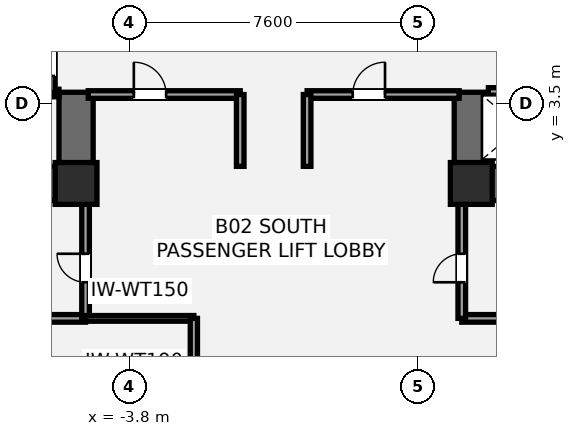
"""IFC4 building model, lengths in metres.
Left out: names, types, materials, properties, quantities, classifications, styles, units other than length and angle.
Written with IfcOpenShell. Run it as: python <this file> out.ifc"""

import sys

from ifc_helpers import new_model, si_unit, direction, frame, frame_2d, origin, origin_2d, place, context, subcontext, project, spatial, rectangle, extrude, element, fill, save


model = new_model("IFC4")
c1 = context("Model", 3, precision=1e-05, world=origin(), true_north=direction((0.0, 1.0)))
c2 = subcontext(c1, "Body", "Model", "MODEL_VIEW")
j1 = project(units=[si_unit("LENGTHUNIT", "METRE"), si_unit("PLANEANGLEUNIT", "RADIAN")], contexts=[c1])
p1 = place(None, origin())
s1 = spatial("IfcSite", under=j1, at=p1, CompositionType="ELEMENT")
p2 = place(p1, origin())
s2 = spatial("IfcBuilding", under=s1, at=p2, CompositionType="ELEMENT")
p3 = place(p2, frame((0.0, 0.0, -8.8)))
s3 = spatial("IfcBuildingStorey", under=s2, at=p3, CompositionType="ELEMENT", Elevation=-8.8)
p4 = place(p3, frame((-4.75, 1.4, 0.0), z_axis=(0.0, 0.0, 1.0), x_axis=(-1.0, 0.0, 0.0)))
e1 = element("IfcWall", 1, at=p4, inside=s3, PredefinedType="SHEAR", context=c2, shape_type="SweptSolid", body=[
    extrude(rectangle(XDim=9.3, YDim=0.9, at=frame_2d((4.65, 0.0))), origin(), (0.0, 0.0, 1.0), 4.4),
])
p5 = place(p4, frame((5.55, 0.0, 0.0)))
e2 = element("IfcOpeningElement", 2, at=p5, cuts=e1, PredefinedType="OPENING", context=c2, shape_type="SweptSolid", body=[
    extrude(rectangle(XDim=1.05, YDim=2.15, at=frame_2d((0.525, 1.075))), frame((0.0, 0.46, 0.0), z_axis=(0.0, -1.0, 0.0), x_axis=(1.0, 0.0, 0.0)), (0.0, 0.0, 1.0), 0.92),
])
p6 = place(p4, frame((3.88, 0.0, 0.0)))
e3 = element("IfcOpeningElement", 3, at=p6, cuts=e1, PredefinedType="OPENING", context=c2, shape_type="SweptSolid", body=[
    extrude(rectangle(XDim=1.1, YDim=2.2, at=frame_2d((0.55, 1.1))), frame((0.0, 0.46, 0.0), z_axis=(0.0, -1.0, 0.0), x_axis=(1.0, 0.0, 0.0)), (0.0, 0.0, 1.0), 0.92),
])
p7 = place(p3, frame((-5.2, 0.95, 0.0), z_axis=(0.0, 0.0, 1.0), x_axis=(0.0, 1.0, 0.0)))
e4 = element("IfcWall", 4, at=p7, inside=s3, PredefinedType="SHEAR", context=c2, shape_type="SweptSolid", body=[
    extrude(rectangle(XDim=2.85, YDim=0.9, at=frame_2d((1.425, 0.0))), origin(), (0.0, 0.0, 1.0), 4.4),
])
p8 = place(p3, frame((14.05, 1.4, 0.0), z_axis=(0.0, 0.0, 1.0), x_axis=(-1.0, 0.0, 0.0)))
e5 = element("IfcWall", 5, at=p8, inside=s3, PredefinedType="SHEAR", context=c2, shape_type="SweptSolid", body=[
    extrude(rectangle(XDim=9.3, YDim=0.9, at=frame_2d((4.65, 0.0))), origin(), (0.0, 0.0, 1.0), 4.4),
])
p9 = place(p8, frame((2.7, 0.0, 0.0)))
e6 = element("IfcOpeningElement", 6, at=p9, cuts=e5, PredefinedType="OPENING", context=c2, shape_type="SweptSolid", body=[
    extrude(rectangle(XDim=1.05, YDim=2.15, at=frame_2d((0.525, 1.075))), frame((0.0, 0.46, 0.0), z_axis=(0.0, -1.0, 0.0), x_axis=(1.0, 0.0, 0.0)), (0.0, 0.0, 1.0), 0.92),
])
p10 = place(p8, frame((4.7, 0.0, 0.0)))
e7 = element("IfcOpeningElement", 7, at=p10, cuts=e5, PredefinedType="OPENING", context=c2, shape_type="SweptSolid", body=[
    extrude(rectangle(XDim=1.1, YDim=2.2, at=frame_2d((0.55, 1.1))), frame((0.0, 0.46, 0.0), z_axis=(0.0, -1.0, 0.0), x_axis=(1.0, 0.0, 0.0)), (0.0, 0.0, 1.0), 0.92),
])
p11 = place(p3, frame((5.2, 0.95, 0.0), z_axis=(0.0, 0.0, 1.0), x_axis=(0.0, 1.0, 0.0)))
e8 = element("IfcWall", 8, at=p11, inside=s3, PredefinedType="SHEAR", context=c2, shape_type="SweptSolid", body=[
    extrude(rectangle(XDim=2.85, YDim=0.9, at=frame_2d((1.425, 0.0))), origin(), (0.0, 0.0, 1.0), 4.4),
])
for number, where, z_axis, x_axis in (
    (9, (-5.2, 1.4, 0.0), (0.0, 0.0, 1.0), (1.0, 0.0, 0.0)),
    (10, (5.2, 1.4, 0.0), (0.0, 0.0, 1.0), (1.0, 0.0, 0.0)),
):
    element("IfcColumn", number, at=place(p3, frame(where, z_axis=z_axis, x_axis=x_axis)), inside=s3, PredefinedType="COLUMN", context=c2, shape_type="SweptSolid", body=[
        extrude(rectangle(XDim=1.1, YDim=1.1, at=origin_2d()), origin(), (0.0, 0.0, 1.0), 4.4),
    ])
p12 = place(p3, frame((-7.2, -2.15, 0.0), z_axis=(0.0, 0.0, 1.0), x_axis=(1.0, 0.0, 0.0)))
e11 = element("IfcWall", 11, at=p12, inside=s3, PredefinedType="SOLIDWALL", context=c2, shape_type="SweptSolid", body=[
    extrude(rectangle(XDim=2.25, YDim=0.2, at=frame_2d((1.125, 0.0))), origin(), (0.0, 0.0, 1.0), 4.14),
])
p13 = place(p3, frame((-4.95, -2.15, 0.0), z_axis=(0.0, 0.0, 1.0), x_axis=(0.0, 1.0, 0.0)))
e12 = element("IfcWall", 12, at=p13, inside=s3, PredefinedType="SOLIDWALL", context=c2, shape_type="SweptSolid", body=[
    extrude(rectangle(XDim=3.15, YDim=0.2, at=frame_2d((1.575, 0.0))), origin(), (0.0, 0.0, 1.0), 3.508),
])
p14 = place(p13, frame((0.95, 0.0, 0.0)))
e13 = element("IfcOpeningElement", 13, at=p14, cuts=e12, PredefinedType="OPENING", context=c2, shape_type="SweptSolid", body=[
    extrude(rectangle(XDim=0.75, YDim=2.1, at=frame_2d((0.375, 1.05))), frame((0.0, 0.11, 0.0), z_axis=(0.0, -1.0, 0.0), x_axis=(1.0, 0.0, 0.0)), (0.0, 0.0, 1.0), 0.22),
])
p15 = place(p3, frame((4.95, -2.15, 0.0), z_axis=(0.0, 0.0, 1.0), x_axis=(1.0, 0.0, 0.0)))
e14 = element("IfcWall", 14, at=p15, inside=s3, PredefinedType="SOLIDWALL", context=c2, shape_type="SweptSolid", body=[
    extrude(rectangle(XDim=2.25, YDim=0.2, at=frame_2d((1.125, 0.0))), origin(), (0.0, 0.0, 1.0), 4.14),
])
p16 = place(p3, frame((4.95, -2.15, 0.0), z_axis=(0.0, 0.0, 1.0), x_axis=(0.0, 1.0, 0.0)))
e15 = element("IfcWall", 15, at=p16, inside=s3, PredefinedType="SOLIDWALL", context=c2, shape_type="SweptSolid", body=[
    extrude(rectangle(XDim=3.15, YDim=0.2, at=frame_2d((1.575, 0.0))), origin(), (0.0, 0.0, 1.0), 3.508),
])
p17 = place(p16, frame((0.95, 0.0, 0.0)))
e16 = element("IfcOpeningElement", 16, at=p17, cuts=e15, PredefinedType="OPENING", context=c2, shape_type="SweptSolid", body=[
    extrude(rectangle(XDim=0.75, YDim=2.1, at=frame_2d((0.375, 1.05))), frame((0.0, 0.11, 0.0), z_axis=(0.0, -1.0, 0.0), x_axis=(1.0, 0.0, 0.0)), (0.0, 0.0, 1.0), 0.22),
])
p18 = place(p3, frame((-9.78, 3.78, 0.0), z_axis=(0.0, 0.0, 1.0), x_axis=(1.0, 0.0, 0.0)))
e17 = element("IfcWall", 17, at=p18, inside=s3, PredefinedType="SOLIDWALL", context=c2, shape_type="SweptSolid", body=[
    extrude(rectangle(XDim=4.13, YDim=0.2, at=frame_2d((2.065, 0.0))), origin(), (0.0, 0.0, 1.0), 4.14),
])
p19 = place(p3, frame((-5.85, 3.78, 0.0), z_axis=(0.0, 0.0, 1.0), x_axis=(0.0, 1.0, 0.0)))
e18 = element("IfcWall", 18, at=p19, inside=s3, PredefinedType="SOLIDWALL", context=c2, shape_type="SweptSolid", body=[
    extrude(rectangle(XDim=1.69, YDim=0.2, at=frame_2d((0.845, 0.0))), origin(), (0.0, 0.0, 1.0), 4.14),
])
p20 = place(p19, frame((0.45, 0.0, 0.0)))
e19 = element("IfcOpeningElement", 19, at=p20, cuts=e18, PredefinedType="OPENING", context=c2, shape_type="SweptSolid", body=[
    extrude(rectangle(XDim=0.85, YDim=2.1, at=frame_2d((0.425, 1.05))), frame((0.0, 0.11, 0.0), z_axis=(0.0, -1.0, 0.0), x_axis=(1.0, 0.0, 0.0)), (0.0, 0.0, 1.0), 0.22),
])
p21 = place(p3, frame((5.65, 3.82, 0.0), z_axis=(0.0, 0.0, 1.0), x_axis=(1.0, 0.0, 0.0)))
e20 = element("IfcWall", 20, at=p21, inside=s3, PredefinedType="SOLIDWALL", context=c2, shape_type="SweptSolid", body=[
    extrude(rectangle(XDim=4.13, YDim=0.2, at=frame_2d((2.065, 0.0))), origin(), (0.0, 0.0, 1.0), 4.14),
])
p22 = place(p21, frame((0.65, 0.0, 0.0)))
e21 = element("IfcOpeningElement", 21, at=p22, cuts=e20, PredefinedType="OPENING", context=c2, shape_type="SweptSolid", body=[
    extrude(rectangle(XDim=1.2, YDim=2.2, at=frame_2d((0.6, 1.1))), frame((0.0, 0.11, 0.0), z_axis=(0.0, -1.0, 0.0), x_axis=(1.0, 0.0, 0.0)), (0.0, 0.0, 1.0), 0.22),
])
p23 = place(p3, frame((-4.88, 3.74, 0.0), z_axis=(0.0, 0.0, 1.0), x_axis=(1.0, 0.0, 0.0)))
e22 = element("IfcWall", 22, at=p23, inside=s3, PredefinedType="SOLIDWALL", context=c2, shape_type="SweptSolid", body=[
    extrude(rectangle(XDim=4.0, YDim=0.2, at=frame_2d((2.0, 0.0))), origin(), (0.0, 0.0, 1.0), 4.14),
])
p24 = place(p23, frame((1.2, 0.0, 0.0)))
e23 = element("IfcOpeningElement", 23, at=p24, cuts=e22, PredefinedType="OPENING", context=c2, shape_type="SweptSolid", body=[
    extrude(rectangle(XDim=0.85, YDim=2.1, at=frame_2d((0.425, 1.05))), frame((0.0, 0.11, 0.0), z_axis=(0.0, -1.0, 0.0), x_axis=(1.0, 0.0, 0.0)), (0.0, 0.0, 1.0), 0.22),
])
p25 = place(p3, frame((0.88, 3.74, 0.0), z_axis=(0.0, 0.0, 1.0), x_axis=(1.0, 0.0, 0.0)))
e24 = element("IfcWall", 24, at=p25, inside=s3, PredefinedType="SOLIDWALL", context=c2, shape_type="SweptSolid", body=[
    extrude(rectangle(XDim=4.0, YDim=0.2, at=frame_2d((2.0, 0.0))), origin(), (0.0, 0.0, 1.0), 4.14),
])
p26 = place(p25, frame((1.2, 0.0, 0.0)))
e25 = element("IfcOpeningElement", 25, at=p26, cuts=e24, PredefinedType="OPENING", context=c2, shape_type="SweptSolid", body=[
    extrude(rectangle(XDim=0.85, YDim=2.1, at=frame_2d((0.425, 1.05))), frame((0.0, 0.11, 0.0), z_axis=(0.0, -1.0, 0.0), x_axis=(1.0, 0.0, 0.0)), (0.0, 0.0, 1.0), 0.22),
])
for number, where, z_axis, x_axis in (
    (26, (-0.88, 1.85, 0.0), (0.0, 0.0, 1.0), (0.0, 1.0, 0.0)),
    (27, (0.88, 1.85, 0.0), (0.0, 0.0, 1.0), (0.0, 1.0, 0.0)),
):
    element("IfcWall", number, at=place(p3, frame(where, z_axis=z_axis, x_axis=x_axis)), inside=s3, PredefinedType="SOLIDWALL", context=c2, shape_type="SweptSolid", body=[
        extrude(rectangle(XDim=1.89, YDim=0.2, at=frame_2d((0.945, 0.0))), origin(), (0.0, 0.0, 1.0), 4.14),
    ])
p27 = place(p3, frame((-4.95, -2.15, 0.0), z_axis=(0.0, 0.0, 1.0), x_axis=(1.0, 0.0, 0.0)))
e28 = element("IfcWall", 28, at=p27, inside=s3, PredefinedType="PLUMBINGWALL", context=c2, shape_type="SweptSolid", body=[
    extrude(rectangle(XDim=2.85, YDim=0.15, at=frame_2d((1.425, 0.0))), origin(), (0.0, 0.0, 1.0), 4.14),
])
p28 = place(p3, frame((-2.1, -4.05, 0.0), z_axis=(0.0, 0.0, 1.0), x_axis=(0.0, 1.0, 0.0)))
e29 = element("IfcWall", 29, at=p28, inside=s3, PredefinedType="PLUMBINGWALL", context=c2, shape_type="SweptSolid", body=[
    extrude(rectangle(XDim=1.9, YDim=0.19, at=frame_2d((0.95, 0.0))), origin(), (0.0, 0.0, 1.0), 4.14),
])
p29 = place(p14, origin())
e30 = element("IfcDoor", 30, at=p29, inside=s3, OperationType="SINGLE_SWING_RIGHT", PredefinedType="DOOR", context=c2, shape_type="SweptSolid", body=[
    extrude(rectangle(XDim=0.75, YDim=2.1, at=frame_2d((0.375, 1.05))), frame((0.0, 0.025, 0.0), z_axis=(0.0, -1.0, 0.0), x_axis=(1.0, 0.0, 0.0)), (0.0, 0.0, 1.0), 0.05),
])
fill(e13, e30)
p30 = place(p17, origin())
e31 = element("IfcDoor", 31, at=p30, inside=s3, OperationType="SINGLE_SWING_LEFT", PredefinedType="DOOR", context=c2, shape_type="SweptSolid", body=[
    extrude(rectangle(XDim=0.75, YDim=2.1, at=frame_2d((0.375, 1.05))), frame((0.0, 0.025, 0.0), z_axis=(0.0, -1.0, 0.0), x_axis=(1.0, 0.0, 0.0)), (0.0, 0.0, 1.0), 0.05),
])
fill(e16, e31)
p31 = place(p20, origin())
e32 = element("IfcDoor", 32, at=p31, inside=s3, OperationType="SINGLE_SWING_RIGHT", PredefinedType="DOOR", context=c2, shape_type="SweptSolid", body=[
    extrude(rectangle(XDim=0.85, YDim=2.1, at=frame_2d((0.425, 1.05))), frame((0.0, 0.025, 0.0), z_axis=(0.0, -1.0, 0.0), x_axis=(1.0, 0.0, 0.0)), (0.0, 0.0, 1.0), 0.05),
])
fill(e19, e32)
p32 = place(p24, origin())
e33 = element("IfcDoor", 33, at=p32, inside=s3, OperationType="SINGLE_SWING_LEFT", PredefinedType="DOOR", context=c2, shape_type="SweptSolid", body=[
    extrude(rectangle(XDim=0.85, YDim=2.1, at=frame_2d((0.425, 1.05))), frame((0.0, 0.025, 0.0), z_axis=(0.0, -1.0, 0.0), x_axis=(1.0, 0.0, 0.0)), (0.0, 0.0, 1.0), 0.05),
])
fill(e23, e33)
p33 = place(p26, origin())
e34 = element("IfcDoor", 34, at=p33, inside=s3, OperationType="SINGLE_SWING_RIGHT", PredefinedType="DOOR", context=c2, shape_type="SweptSolid", body=[
    extrude(rectangle(XDim=0.85, YDim=2.1, at=frame_2d((0.425, 1.05))), frame((0.0, 0.025, 0.0), z_axis=(0.0, -1.0, 0.0), x_axis=(1.0, 0.0, 0.0)), (0.0, 0.0, 1.0), 0.05),
])
fill(e25, e34)
save(model, sys.argv[1])
